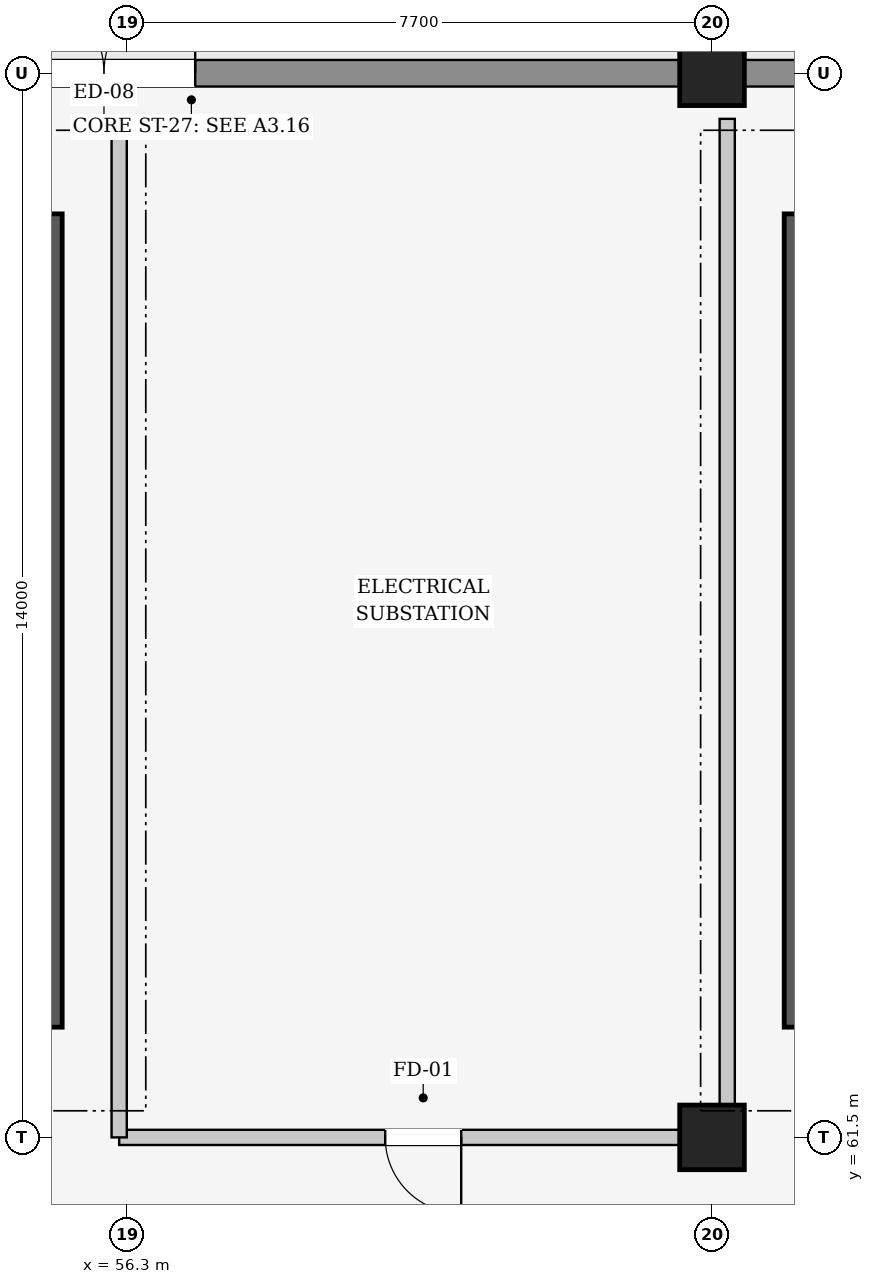
"""IFC4 building model, lengths in metres.
Left out: names, types, materials, properties, quantities, classifications, styles, units other than length and angle.
Written with IfcOpenShell. Run it as: python <this file> out.ifc"""

import sys

from ifc_helpers import new_model, si_unit, direction, frame, frame_2d, origin, origin_2d, place, context, subcontext, project, spatial, rectangle, extrude, element, fill, save


model = new_model("IFC4")
c1 = context("Model", 3, precision=1e-05, world=origin(), true_north=direction((0.0, 1.0)))
c2 = subcontext(c1, "Body", "Model", "MODEL_VIEW")
j1 = project(units=[si_unit("LENGTHUNIT", "METRE"), si_unit("PLANEANGLEUNIT", "RADIAN")], contexts=[c1])
p1 = place(None, origin())
s1 = spatial("IfcSite", under=j1, at=p1, CompositionType="ELEMENT")
p2 = place(p1, origin())
s2 = spatial("IfcBuilding", under=s1, at=p2, CompositionType="ELEMENT")
p3 = place(p2, origin())
s3 = spatial("IfcBuildingStorey", under=s2, at=p3, CompositionType="ELEMENT", Elevation=0.0)
for number, where, z_axis, x_axis in (
    (1, (64.0, 61.5, 0.0), (0.0, 0.0, 1.0), (1.0, 0.0, 0.0)),
    (2, (64.0, 75.5, 0.0), (0.0, 0.0, 1.0), (1.0, 0.0, 0.0)),
):
    element("IfcColumn", number, at=place(p3, frame(where, z_axis=z_axis, x_axis=x_axis)), inside=s3, PredefinedType="COLUMN", context=c2, shape_type="SweptSolid", body=[
        extrude(rectangle(XDim=0.85, YDim=0.85, at=origin_2d()), origin(), (0.0, 0.0, 1.0), 6.0),
    ])
p4 = place(p3, frame((48.407, 75.5, 0.0), z_axis=(0.0, 0.0, 1.0), x_axis=(1.0, 0.0, 0.0)))
e3 = element("IfcWall", 3, at=p4, inside=s3, PredefinedType="SOLIDWALL", context=c2, shape_type="SweptSolid", body=[
    extrude(rectangle(XDim=15.186, YDim=0.35, at=frame_2d((7.593, 0.0))), origin(), (0.0, 0.0, 1.0), 4.74),
])
p5 = place(p4, frame((6.393, 0.0, 0.0)))
e4 = element("IfcOpeningElement", 4, at=p5, cuts=e3, PredefinedType="OPENING", context=c2, shape_type="SweptSolid", body=[
    extrude(rectangle(XDim=2.4, YDim=2.6, at=frame_2d((1.2, 1.3))), frame((0.0, 0.185, 0.0), z_axis=(0.0, -1.0, 0.0), x_axis=(1.0, 0.0, 0.0)), (0.0, 0.0, 1.0), 0.37),
])
p6 = place(p3, frame((64.407, 75.5, 0.0), z_axis=(0.0, 0.0, 1.0), x_axis=(1.0, 0.0, 0.0)))
e5 = element("IfcWall", 5, at=p6, inside=s3, PredefinedType="SOLIDWALL", context=c2, shape_type="SweptSolid", body=[
    extrude(rectangle(XDim=7.186, YDim=0.35, at=frame_2d((3.593, 0.0))), origin(), (0.0, 0.0, 1.0), 4.94),
])
for number, where, z_axis, x_axis in (
    (6, (55.325, 73.65, 0.0), (0.0, 0.0, 1.0), (0.0, -1.0, 0.0)),
    (7, (65.075, 62.95, 0.0), (0.0, 0.0, 1.0), (0.0, 1.0, 0.0)),
):
    element("IfcWall", number, at=place(p3, frame(where, z_axis=z_axis, x_axis=x_axis)), inside=s3, PredefinedType="SHEAR", context=c2, shape_type="SweptSolid", body=[
        extrude(rectangle(XDim=10.7, YDim=0.25, at=frame_2d((5.35, 0.0))), origin(), (0.0, 0.0, 1.0), 6.0),
    ])
p7 = place(p3, frame((64.2, 61.5, 0.0), z_axis=(0.0, 0.0, 1.0), x_axis=(-1.0, 0.0, 0.0)))
e8 = element("IfcWall", 8, at=p7, inside=s3, PredefinedType="PARTITIONING", context=c2, shape_type="SweptSolid", body=[
    extrude(rectangle(XDim=8.0, YDim=0.2, at=frame_2d((4.0, 0.0))), origin(), (0.0, 0.0, 1.0), 4.725),
])
p8 = place(p7, frame((3.5, 0.0, 0.0)))
e9 = element("IfcOpeningElement", 9, at=p8, cuts=e8, PredefinedType="OPENING", context=c2, shape_type="SweptSolid", body=[
    extrude(rectangle(XDim=1.0, YDim=2.15, at=frame_2d((0.5, 1.075))), frame((0.0, 0.11, 0.0), z_axis=(0.0, -1.0, 0.0), x_axis=(1.0, 0.0, 0.0)), (0.0, 0.0, 1.0), 0.22),
])
p9 = place(p3, frame((56.2, 61.5, 0.0), z_axis=(0.0, 0.0, 1.0), x_axis=(0.0, 1.0, 0.0)))
e10 = element("IfcWall", 10, at=p9, inside=s3, PredefinedType="PARTITIONING", context=c2, shape_type="SweptSolid", body=[
    extrude(rectangle(XDim=13.4, YDim=0.2, at=frame_2d((6.7, 0.0))), origin(), (0.0, 0.0, 1.0), 4.725),
])
p10 = place(p3, frame((64.2, 74.9, 0.0), z_axis=(0.0, 0.0, 1.0), x_axis=(0.0, -1.0, 0.0)))
e11 = element("IfcWall", 11, at=p10, inside=s3, PredefinedType="PARTITIONING", context=c2, shape_type="SweptSolid", body=[
    extrude(rectangle(XDim=13.4, YDim=0.2, at=frame_2d((6.7, 0.0))), origin(), (0.0, 0.0, 1.0), 4.925),
])
p11 = place(p5, origin())
e12 = element("IfcDoor", 12, at=p11, inside=s3, OperationType="DOUBLE_DOOR_SINGLE_SWING", PredefinedType="DOOR", context=c2, shape_type="SweptSolid", body=[
    extrude(rectangle(XDim=2.4, YDim=2.6, at=frame_2d((1.2, 1.3))), frame((0.0, 0.025, 0.0), z_axis=(0.0, -1.0, 0.0), x_axis=(1.0, 0.0, 0.0)), (0.0, 0.0, 1.0), 0.05),
])
fill(e4, e12)
p12 = place(p8, origin())
e13 = element("IfcDoor", 13, at=p12, inside=s3, OperationType="SINGLE_SWING_LEFT", PredefinedType="DOOR", context=c2, shape_type="SweptSolid", body=[
    extrude(rectangle(XDim=1.0, YDim=2.15, at=frame_2d((0.5, 1.075))), frame((0.0, 0.025, 0.0), z_axis=(0.0, -1.0, 0.0), x_axis=(1.0, 0.0, 0.0)), (0.0, 0.0, 1.0), 0.05),
])
fill(e9, e13)
save(model, sys.argv[1])
